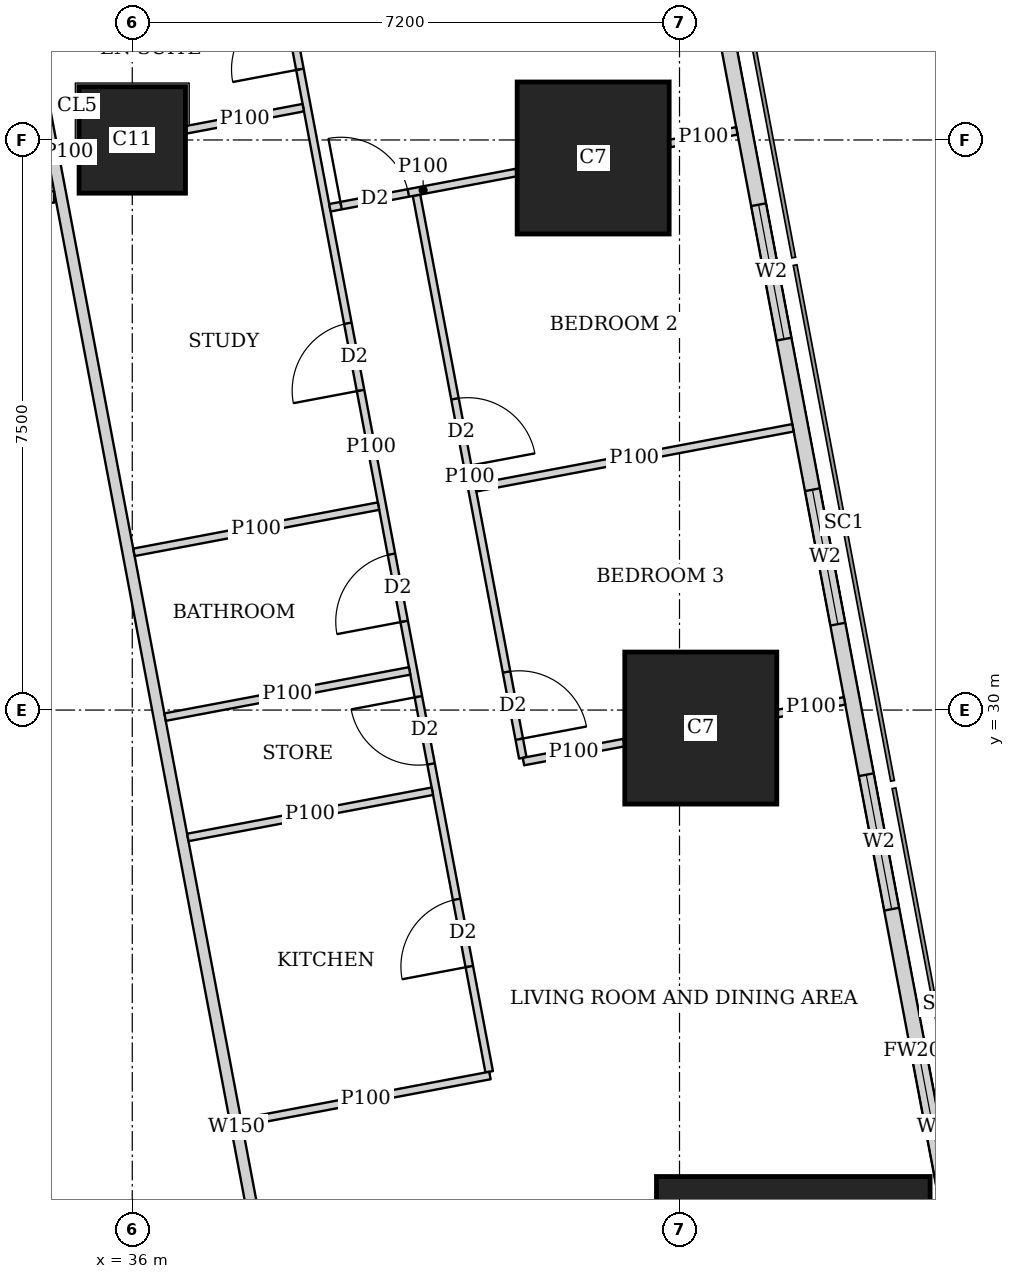
"""IFC4 building model, lengths in metres.
Left out: names, types, materials, properties, quantities, classifications, styles, units other than length and angle.
Written with IfcOpenShell. Run it as: python <this file> out.ifc"""

import sys

from ifc_helpers import new_model, si_unit, direction, frame, frame_2d, origin, origin_2d, place, context, subcontext, project, spatial, rectangle, extrude, element, fill, save


model = new_model("IFC4")
c1 = context("Model", 3, precision=1e-05, world=origin(), true_north=direction((0.0, 1.0)))
c2 = subcontext(c1, "Body", "Model", "MODEL_VIEW")
j1 = project(units=[si_unit("LENGTHUNIT", "METRE"), si_unit("PLANEANGLEUNIT", "RADIAN")], contexts=[c1])
p1 = place(None, origin())
s1 = spatial("IfcSite", under=j1, at=p1, CompositionType="ELEMENT")
p2 = place(p1, origin())
s2 = spatial("IfcBuilding", under=s1, at=p2, CompositionType="ELEMENT")
p3 = place(p2, frame((0.0, 0.0, 292.85)))
s3 = spatial("IfcBuildingStorey", under=s2, at=p3, CompositionType="ELEMENT", Elevation=292.85)
p4 = place(p3, frame((44.697, 22.263, 0.0), z_axis=(0.0, 0.0, 1.0), x_axis=(1.0, 0.0, 0.0)))
e1 = element("IfcColumn", 1, at=p4, inside=s3, PredefinedType="COLUMN", context=c2, shape_type="SweptSolid", body=[
    extrude(rectangle(XDim=3.6, YDim=3.2, at=origin_2d()), origin(), (0.0, 0.0, 1.0), 3.75),
])
p5 = place(p3, frame((43.48, 29.763, 0.0), z_axis=(0.0, 0.0, 1.0), x_axis=(1.0, 0.0, 0.0)))
e2 = element("IfcColumn", 2, at=p5, inside=s3, PredefinedType="COLUMN", context=c2, shape_type="SweptSolid", body=[
    extrude(rectangle(XDim=2.0, YDim=2.0, at=origin_2d()), origin(), (0.0, 0.0, 1.0), 3.75),
])
p6 = place(p3, frame((36.0, 37.5, 0.0), z_axis=(0.0, 0.0, 1.0), x_axis=(1.0, 0.0, 0.0)))
e3 = element("IfcColumn", 3, at=p6, inside=s3, PredefinedType="COLUMN", context=c2, shape_type="SweptSolid", body=[
    extrude(rectangle(XDim=1.4, YDim=1.4, at=origin_2d()), origin(), (0.0, 0.0, 1.0), 3.75),
])
p7 = place(p3, frame((42.064, 37.263, 0.0), z_axis=(0.0, 0.0, 1.0), x_axis=(1.0, 0.0, 0.0)))
e4 = element("IfcColumn", 4, at=p7, inside=s3, PredefinedType="COLUMN", context=c2, shape_type="SweptSolid", body=[
    extrude(rectangle(XDim=2.0, YDim=2.0, at=origin_2d()), origin(), (0.0, 0.0, 1.0), 3.75),
])
p8 = place(p3, frame((49.684, 7.832, 0.0), z_axis=(0.0, 0.0, 1.0), x_axis=(-0.185616669694, 0.982622232565, 0.0)))
e5 = element("IfcWall", 5, at=p8, inside=s3, PredefinedType="SOLIDWALL", context=c2, shape_type="SweptSolid", body=[
    extrude(rectangle(XDim=36.0, YDim=0.2, at=frame_2d((18.0, 0.0))), origin(), (0.0, 0.0, 1.0), 3.4),
])
p9 = place(p8, frame((2.518, 0.0, 0.9)))
e6 = element("IfcOpeningElement", 6, at=p9, cuts=e5, PredefinedType="OPENING", context=c2, shape_type="SweptSolid", body=[
    extrude(rectangle(XDim=2.4, YDim=1.5, at=frame_2d((1.2, 0.75))), frame((0.0, 0.11, 0.0), z_axis=(0.0, -1.0, 0.0), x_axis=(1.0, 0.0, 0.0)), (0.0, 0.0, 1.0), 0.22),
])
p10 = place(p8, frame((8.444, 0.0, 0.9)))
e7 = element("IfcOpeningElement", 7, at=p10, cuts=e5, PredefinedType="OPENING", context=c2, shape_type="SweptSolid", body=[
    extrude(rectangle(XDim=1.8, YDim=1.5, at=frame_2d((0.9, 0.75))), frame((0.0, 0.11, 0.0), z_axis=(0.0, -1.0, 0.0), x_axis=(1.0, 0.0, 0.0)), (0.0, 0.0, 1.0), 0.22),
])
p11 = place(p8, frame((12.261, 0.0, 0.9)))
e8 = element("IfcOpeningElement", 8, at=p11, cuts=e5, PredefinedType="OPENING", context=c2, shape_type="SweptSolid", body=[
    extrude(rectangle(XDim=1.8, YDim=1.5, at=frame_2d((0.9, 0.75))), frame((0.0, 0.11, 0.0), z_axis=(0.0, -1.0, 0.0), x_axis=(1.0, 0.0, 0.0)), (0.0, 0.0, 1.0), 0.22),
])
p12 = place(p8, frame((16.078, 0.0, 0.9)))
e9 = element("IfcOpeningElement", 9, at=p12, cuts=e5, PredefinedType="OPENING", context=c2, shape_type="SweptSolid", body=[
    extrude(rectangle(XDim=1.8, YDim=1.5, at=frame_2d((0.9, 0.75))), frame((0.0, 0.11, 0.0), z_axis=(0.0, -1.0, 0.0), x_axis=(1.0, 0.0, 0.0)), (0.0, 0.0, 1.0), 0.22),
])
p13 = place(p8, frame((19.894, 0.0, 0.9)))
e10 = element("IfcOpeningElement", 10, at=p13, cuts=e5, PredefinedType="OPENING", context=c2, shape_type="SweptSolid", body=[
    extrude(rectangle(XDim=1.8, YDim=1.5, at=frame_2d((0.9, 0.75))), frame((0.0, 0.11, 0.0), z_axis=(0.0, -1.0, 0.0), x_axis=(1.0, 0.0, 0.0)), (0.0, 0.0, 1.0), 0.22),
])
p14 = place(p8, frame((23.71, 0.0, 0.9)))
e11 = element("IfcOpeningElement", 11, at=p14, cuts=e5, PredefinedType="OPENING", context=c2, shape_type="SweptSolid", body=[
    extrude(rectangle(XDim=1.8, YDim=1.5, at=frame_2d((0.9, 0.75))), frame((0.0, 0.11, 0.0), z_axis=(0.0, -1.0, 0.0), x_axis=(1.0, 0.0, 0.0)), (0.0, 0.0, 1.0), 0.22),
])
p15 = place(p8, frame((27.526, 0.0, 0.9)))
e12 = element("IfcOpeningElement", 12, at=p15, cuts=e5, PredefinedType="OPENING", context=c2, shape_type="SweptSolid", body=[
    extrude(rectangle(XDim=1.8, YDim=1.5, at=frame_2d((0.9, 0.75))), frame((0.0, 0.11, 0.0), z_axis=(0.0, -1.0, 0.0), x_axis=(1.0, 0.0, 0.0)), (0.0, 0.0, 1.0), 0.22),
])
p16 = place(p8, frame((32.046, 0.0, 0.9)))
e13 = element("IfcOpeningElement", 13, at=p16, cuts=e5, PredefinedType="OPENING", context=c2, shape_type="SweptSolid", body=[
    extrude(rectangle(XDim=1.8, YDim=1.5, at=frame_2d((0.9, 0.75))), frame((0.0, 0.11, 0.0), z_axis=(0.0, -1.0, 0.0), x_axis=(1.0, 0.0, 0.0)), (0.0, 0.0, 1.0), 0.22),
])
p17 = place(p3, frame((29.501, 36.75, 0.0), z_axis=(0.0, 0.0, 1.0), x_axis=(1.0, 0.0, 0.0)))
e14 = element("IfcWall", 14, at=p17, inside=s3, PredefinedType="SOLIDWALL", context=c2, shape_type="SweptSolid", body=[
    extrude(rectangle(XDim=5.471, YDim=0.15, at=frame_2d((2.735, 0.0))), origin(), (0.0, 0.0, 1.0), 3.4),
])
p18 = place(p3, frame((34.036, 42.186, 0.0), z_axis=(0.0, 0.0, 1.0), x_axis=(0.185593518645, -0.9826266055, 0.0)))
e15 = element("IfcWall", 15, at=p18, inside=s3, PredefinedType="SOLIDWALL", context=c2, shape_type="SweptSolid", body=[
    extrude(rectangle(XDim=35.961, YDim=0.15, at=frame_2d((17.98, 0.0))), origin(), (0.0, 0.0, 1.0), 2.4),
])
p19 = place(p18, frame((19.345, 0.0, 0.0)))
e16 = element("IfcOpeningElement", 16, at=p19, cuts=e15, PredefinedType="OPENING", context=c2, shape_type="SweptSolid", body=[
    extrude(rectangle(XDim=1.0, YDim=2.1, at=frame_2d((0.5, 1.05))), frame((0.0, 0.085, 0.0), z_axis=(0.0, -1.0, 0.0), x_axis=(1.0, 0.0, 0.0)), (0.0, 0.0, 1.0), 0.17),
])
p20 = place(p18, frame((33.774, 0.0, 0.0)))
e17 = element("IfcOpeningElement", 17, at=p20, cuts=e15, PredefinedType="OPENING", context=c2, shape_type="SweptSolid", body=[
    extrude(rectangle(XDim=1.0, YDim=2.1, at=frame_2d((0.5, 1.05))), frame((0.0, 0.085, 0.0), z_axis=(0.0, -1.0, 0.0), x_axis=(1.0, 0.0, 0.0)), (0.0, 0.0, 1.0), 0.17),
])
p21 = place(p3, frame((43.955, 37.62, 0.0), z_axis=(0.0, 0.0, 1.0), x_axis=(-0.982708424405, -0.18515980288, 0.0)))
e18 = element("IfcWall", 18, at=p21, inside=s3, PredefinedType="PARTITIONING", context=c2, shape_type="SweptSolid", body=[
    extrude(rectangle(XDim=0.897, YDim=0.1, at=frame_2d((0.448, 0.0))), origin(), (0.0, 0.0, 1.0), 3.4),
])
p22 = place(p3, frame((41.054, 37.072, 0.0), z_axis=(0.0, 0.0, 1.0), x_axis=(-0.982579896219, -0.185840650951, 0.0)))
e19 = element("IfcWall", 19, at=p22, inside=s3, PredefinedType="PARTITIONING", context=c2, shape_type="SweptSolid", body=[
    extrude(rectangle(XDim=2.497, YDim=0.1, at=frame_2d((1.249, 0.0))), origin(), (0.0, 0.0, 1.0), 3.4),
])
p23 = place(p22, frame((1.447, 0.0, 0.0)))
e20 = element("IfcOpeningElement", 20, at=p23, cuts=e19, PredefinedType="OPENING", context=c2, shape_type="SweptSolid", body=[
    extrude(rectangle(XDim=0.9, YDim=2.1, at=frame_2d((0.45, 1.05))), frame((0.0, 0.06, 0.0), z_axis=(0.0, -1.0, 0.0), x_axis=(1.0, 0.0, 0.0)), (0.0, 0.0, 1.0), 0.12),
])
p24 = place(p3, frame((44.693, 33.713, 0.0), z_axis=(0.0, 0.0, 1.0), x_axis=(-0.982623519589, -0.185609856287, 0.0)))
e21 = element("IfcWall", 21, at=p24, inside=s3, PredefinedType="PARTITIONING", context=c2, shape_type="SweptSolid", body=[
    extrude(rectangle(XDim=4.25, YDim=0.1, at=frame_2d((2.125, 0.0))), origin(), (0.0, 0.0, 1.0), 2.4),
])
p25 = place(p3, frame((45.372, 30.121, 0.0), z_axis=(0.0, 0.0, 1.0), x_axis=(-0.982547416156, -0.186012297994, 0.0)))
e22 = element("IfcWall", 22, at=p25, inside=s3, PredefinedType="PARTITIONING", context=c2, shape_type="SweptSolid", body=[
    extrude(rectangle(XDim=0.898, YDim=0.1, at=frame_2d((0.449, 0.0))), origin(), (0.0, 0.0, 1.0), 3.4),
])
p26 = place(p3, frame((42.47, 29.572, 0.0), z_axis=(0.0, 0.0, 1.0), x_axis=(-0.982610503289, -0.185678751683, 0.0)))
e23 = element("IfcWall", 23, at=p26, inside=s3, PredefinedType="PARTITIONING", context=c2, shape_type="SweptSolid", body=[
    extrude(rectangle(XDim=1.346, YDim=0.1, at=frame_2d((0.673, 0.0))), origin(), (0.0, 0.0, 1.0), 2.4),
])
p27 = place(p3, frame((38.25, 37.925, 0.0), z_axis=(0.0, 0.0, 1.0), x_axis=(-0.982610209589, -0.185680305934, 0.0)))
e24 = element("IfcWall", 24, at=p27, inside=s3, PredefinedType="PARTITIONING", context=c2, shape_type="SweptSolid", body=[
    extrude(rectangle(XDim=1.567, YDim=0.1, at=frame_2d((0.784, 0.0))), origin(), (0.0, 0.0, 1.0), 3.4),
])
p28 = place(p3, frame((35.29, 37.366, 0.0), z_axis=(0.0, 0.0, 1.0), x_axis=(-0.982395465615, -0.18681313963, 0.0)))
e25 = element("IfcWall", 25, at=p28, inside=s3, PredefinedType="PARTITIONING", context=c2, shape_type="SweptSolid", body=[
    extrude(rectangle(XDim=0.263, YDim=0.1, at=frame_2d((0.131, 0.0))), origin(), (0.0, 0.0, 1.0), 3.4),
])
p29 = place(p3, frame((39.24, 32.683, 0.0), z_axis=(0.0, 0.0, 1.0), x_axis=(-0.982607026909, -0.185697147715, 0.0)))
e26 = element("IfcWall", 26, at=p29, inside=s3, PredefinedType="PARTITIONING", context=c2, shape_type="SweptSolid", body=[
    extrude(rectangle(XDim=3.275, YDim=0.1, at=frame_2d((1.637, 0.0))), origin(), (0.0, 0.0, 1.0), 3.4),
])
p30 = place(p3, frame((39.948, 28.932, 0.0), z_axis=(0.0, 0.0, 1.0), x_axis=(-0.982610347627, -0.185679575441, 0.0)))
e27 = element("IfcWall", 27, at=p30, inside=s3, PredefinedType="PARTITIONING", context=c2, shape_type="SweptSolid", body=[
    extrude(rectangle(XDim=3.274, YDim=0.1, at=frame_2d((1.637, 0.0))), origin(), (0.0, 0.0, 1.0), 3.4),
])
p31 = place(p3, frame((40.706, 25.192, 0.0), z_axis=(0.0, 0.0, 1.0), x_axis=(-0.982633623707, -0.185556356831, 0.0)))
e28 = element("IfcWall", 28, at=p31, inside=s3, PredefinedType="PARTITIONING", context=c2, shape_type="SweptSolid", body=[
    extrude(rectangle(XDim=3.325, YDim=0.1, at=frame_2d((1.663, 0.0))), origin(), (0.0, 0.0, 1.0), 3.4),
])
p32 = place(p3, frame((39.649, 30.515, 0.0), z_axis=(0.0, 0.0, 1.0), x_axis=(-0.982610347627, -0.185679575441, 0.0)))
e29 = element("IfcWall", 29, at=p32, inside=s3, PredefinedType="PARTITIONING", context=c2, shape_type="SweptSolid", body=[
    extrude(rectangle(XDim=3.274, YDim=0.1, at=frame_2d((1.637, 0.0))), origin(), (0.0, 0.0, 1.0), 2.4),
])
p33 = place(p3, frame((37.591, 41.685, 0.0), z_axis=(0.0, 0.0, 1.0), x_axis=(0.185541820726, -0.982636368532, 0.0)))
e30 = element("IfcWall", 30, at=p33, inside=s3, PredefinedType="PARTITIONING", context=c2, shape_type="SweptSolid", body=[
    extrude(rectangle(XDim=16.735, YDim=0.1, at=frame_2d((8.367, 0.0))), origin(), (0.0, 0.0, 1.0), 2.4),
])
p34 = place(p33, frame((2.413, 0.0, 0.0)))
e31 = element("IfcOpeningElement", 31, at=p34, cuts=e30, PredefinedType="OPENING", context=c2, shape_type="SweptSolid", body=[
    extrude(rectangle(XDim=0.9, YDim=2.1, at=frame_2d((0.45, 1.05))), frame((0.0, 0.06, 0.0), z_axis=(0.0, -1.0, 0.0), x_axis=(1.0, 0.0, 0.0)), (0.0, 0.0, 1.0), 0.12),
])
p35 = place(p33, frame((6.713, 0.0, 0.0)))
e32 = element("IfcOpeningElement", 32, at=p35, cuts=e30, PredefinedType="OPENING", context=c2, shape_type="SweptSolid", body=[
    extrude(rectangle(XDim=0.9, YDim=2.1, at=frame_2d((0.45, 1.05))), frame((0.0, 0.06, 0.0), z_axis=(0.0, -1.0, 0.0), x_axis=(1.0, 0.0, 0.0)), (0.0, 0.0, 1.0), 0.12),
])
p36 = place(p33, frame((9.805, 0.0, 0.0)))
e33 = element("IfcOpeningElement", 33, at=p36, cuts=e30, PredefinedType="OPENING", context=c2, shape_type="SweptSolid", body=[
    extrude(rectangle(XDim=0.9, YDim=2.1, at=frame_2d((0.45, 1.05))), frame((0.0, 0.06, 0.0), z_axis=(0.0, -1.0, 0.0), x_axis=(1.0, 0.0, 0.0)), (0.0, 0.0, 1.0), 0.12),
])
p37 = place(p33, frame((11.713, 0.0, 0.0)))
e34 = element("IfcOpeningElement", 34, at=p37, cuts=e30, PredefinedType="OPENING", context=c2, shape_type="SweptSolid", body=[
    extrude(rectangle(XDim=0.9, YDim=2.1, at=frame_2d((0.45, 1.05))), frame((0.0, 0.06, 0.0), z_axis=(0.0, -1.0, 0.0), x_axis=(1.0, 0.0, 0.0)), (0.0, 0.0, 1.0), 0.12),
])
p38 = place(p33, frame((14.426, 0.0, 0.0)))
e35 = element("IfcOpeningElement", 35, at=p38, cuts=e30, PredefinedType="OPENING", context=c2, shape_type="SweptSolid", body=[
    extrude(rectangle(XDim=0.9, YDim=2.1, at=frame_2d((0.45, 1.05))), frame((0.0, 0.06, 0.0), z_axis=(0.0, -1.0, 0.0), x_axis=(1.0, 0.0, 0.0)), (0.0, 0.0, 1.0), 0.12),
])
p39 = place(p3, frame((39.74, 36.773, 0.0), z_axis=(0.0, 0.0, 1.0), x_axis=(0.185583825641, -0.982628436216, 0.0)))
e36 = element("IfcWall", 36, at=p39, inside=s3, PredefinedType="PARTITIONING", context=c2, shape_type="SweptSolid", body=[
    extrude(rectangle(XDim=7.533, YDim=0.1, at=frame_2d((3.766, 0.0))), origin(), (0.0, 0.0, 1.0), 2.4),
])
p40 = place(p39, frame((2.726, 0.0, 0.0)))
e37 = element("IfcOpeningElement", 37, at=p40, cuts=e36, PredefinedType="OPENING", context=c2, shape_type="SweptSolid", body=[
    extrude(rectangle(XDim=0.9, YDim=2.1, at=frame_2d((0.45, 1.05))), frame((0.0, 0.06, 0.0), z_axis=(0.0, -1.0, 0.0), x_axis=(1.0, 0.0, 0.0)), (0.0, 0.0, 1.0), 0.12),
])
p41 = place(p39, frame((6.383, 0.0, 0.0)))
e38 = element("IfcOpeningElement", 38, at=p41, cuts=e36, PredefinedType="OPENING", context=c2, shape_type="SweptSolid", body=[
    extrude(rectangle(XDim=0.9, YDim=2.1, at=frame_2d((0.45, 1.05))), frame((0.0, 0.06, 0.0), z_axis=(0.0, -1.0, 0.0), x_axis=(1.0, 0.0, 0.0)), (0.0, 0.0, 1.0), 0.12),
])
p42 = place(p3, frame((35.83, 15.713, 0.0), z_axis=(0.0, 0.0, 1.0), x_axis=(-0.185534724166, 0.982637708481, 0.0)))
e39 = element("IfcWall", 39, at=p42, inside=s3, PredefinedType="PARTITIONING", context=c2, shape_type="SweptSolid", body=[
    extrude(rectangle(XDim=13.814, YDim=0.125, at=frame_2d((6.907, 0.0))), origin(), (0.0, 0.0, 1.0), 2.4),
])
p43 = place(p42, frame((5.35, 0.0, 0.0)))
e40 = element("IfcOpeningElement", 40, at=p43, cuts=e39, PredefinedType="OPENING", context=c2, shape_type="SweptSolid", body=[
    extrude(rectangle(XDim=1.0, YDim=2.1, at=frame_2d((0.5, 1.05))), frame((0.0, 0.073, 0.0), z_axis=(0.0, -1.0, 0.0), x_axis=(1.0, 0.0, 0.0)), (0.0, 0.0, 1.0), 0.145),
])
p44 = place(p12, origin())
e41 = element("IfcWindow", 41, at=p44, inside=s3, PartitioningType="SINGLE_PANEL", PredefinedType="WINDOW", context=c2, shape_type="SweptSolid", body=[
    extrude(rectangle(XDim=1.8, YDim=1.5, at=frame_2d((0.9, 0.75))), frame((0.0, 0.03, 0.0), z_axis=(0.0, -1.0, 0.0), x_axis=(1.0, 0.0, 0.0)), (0.0, 0.0, 1.0), 0.06),
])
fill(e9, e41)
p45 = place(p13, origin())
e42 = element("IfcWindow", 42, at=p45, inside=s3, PartitioningType="SINGLE_PANEL", PredefinedType="WINDOW", context=c2, shape_type="SweptSolid", body=[
    extrude(rectangle(XDim=1.8, YDim=1.5, at=frame_2d((0.9, 0.75))), frame((0.0, 0.03, 0.0), z_axis=(0.0, -1.0, 0.0), x_axis=(1.0, 0.0, 0.0)), (0.0, 0.0, 1.0), 0.06),
])
fill(e10, e42)
p46 = place(p14, origin())
e43 = element("IfcWindow", 43, at=p46, inside=s3, PartitioningType="SINGLE_PANEL", PredefinedType="WINDOW", context=c2, shape_type="SweptSolid", body=[
    extrude(rectangle(XDim=1.8, YDim=1.5, at=frame_2d((0.9, 0.75))), frame((0.0, 0.03, 0.0), z_axis=(0.0, -1.0, 0.0), x_axis=(1.0, 0.0, 0.0)), (0.0, 0.0, 1.0), 0.06),
])
fill(e11, e43)
p47 = place(p15, origin())
e44 = element("IfcWindow", 44, at=p47, inside=s3, PartitioningType="SINGLE_PANEL", PredefinedType="WINDOW", context=c2, shape_type="SweptSolid", body=[
    extrude(rectangle(XDim=1.8, YDim=1.5, at=frame_2d((0.9, 0.75))), frame((0.0, 0.03, 0.0), z_axis=(0.0, -1.0, 0.0), x_axis=(1.0, 0.0, 0.0)), (0.0, 0.0, 1.0), 0.06),
])
fill(e12, e44)
p48 = place(p23, origin())
e45 = element("IfcDoor", 45, at=p48, inside=s3, OperationType="SINGLE_SWING_LEFT", PredefinedType="DOOR", context=c2, shape_type="SweptSolid", body=[
    extrude(rectangle(XDim=0.9, YDim=2.1, at=frame_2d((0.45, 1.05))), frame((0.0, 0.025, 0.0), z_axis=(0.0, -1.0, 0.0), x_axis=(1.0, 0.0, 0.0)), (0.0, 0.0, 1.0), 0.05),
])
fill(e20, e45)
p49 = place(p34, origin())
e46 = element("IfcDoor", 46, at=p49, inside=s3, OperationType="SINGLE_SWING_LEFT", PredefinedType="DOOR", context=c2, shape_type="SweptSolid", body=[
    extrude(rectangle(XDim=0.9, YDim=2.1, at=frame_2d((0.45, 1.05))), frame((0.0, 0.025, 0.0), z_axis=(0.0, -1.0, 0.0), x_axis=(1.0, 0.0, 0.0)), (0.0, 0.0, 1.0), 0.05),
])
fill(e31, e46)
p50 = place(p35, origin())
e47 = element("IfcDoor", 47, at=p50, inside=s3, OperationType="SINGLE_SWING_LEFT", PredefinedType="DOOR", context=c2, shape_type="SweptSolid", body=[
    extrude(rectangle(XDim=0.9, YDim=2.1, at=frame_2d((0.45, 1.05))), frame((0.0, 0.025, 0.0), z_axis=(0.0, -1.0, 0.0), x_axis=(1.0, 0.0, 0.0)), (0.0, 0.0, 1.0), 0.05),
])
fill(e32, e47)
p51 = place(p36, origin())
e48 = element("IfcDoor", 48, at=p51, inside=s3, OperationType="SINGLE_SWING_LEFT", PredefinedType="DOOR", context=c2, shape_type="SweptSolid", body=[
    extrude(rectangle(XDim=0.9, YDim=2.1, at=frame_2d((0.45, 1.05))), frame((0.0, 0.025, 0.0), z_axis=(0.0, -1.0, 0.0), x_axis=(1.0, 0.0, 0.0)), (0.0, 0.0, 1.0), 0.05),
])
fill(e33, e48)
p52 = place(p37, origin())
e49 = element("IfcDoor", 49, at=p52, inside=s3, OperationType="SINGLE_SWING_RIGHT", PredefinedType="DOOR", context=c2, shape_type="SweptSolid", body=[
    extrude(rectangle(XDim=0.9, YDim=2.1, at=frame_2d((0.45, 1.05))), frame((0.0, 0.025, 0.0), z_axis=(0.0, -1.0, 0.0), x_axis=(1.0, 0.0, 0.0)), (0.0, 0.0, 1.0), 0.05),
])
fill(e34, e49)
p53 = place(p38, origin())
e50 = element("IfcDoor", 50, at=p53, inside=s3, OperationType="SINGLE_SWING_LEFT", PredefinedType="DOOR", context=c2, shape_type="SweptSolid", body=[
    extrude(rectangle(XDim=0.9, YDim=2.1, at=frame_2d((0.45, 1.05))), frame((0.0, 0.025, 0.0), z_axis=(0.0, -1.0, 0.0), x_axis=(1.0, 0.0, 0.0)), (0.0, 0.0, 1.0), 0.05),
])
fill(e35, e50)
p54 = place(p40, origin())
e51 = element("IfcDoor", 51, at=p54, inside=s3, OperationType="SINGLE_SWING_RIGHT", PredefinedType="DOOR", context=c2, shape_type="SweptSolid", body=[
    extrude(rectangle(XDim=0.9, YDim=2.1, at=frame_2d((0.45, 1.05))), frame((0.0, 0.025, 0.0), z_axis=(0.0, -1.0, 0.0), x_axis=(1.0, 0.0, 0.0)), (0.0, 0.0, 1.0), 0.05),
])
fill(e37, e51)
p55 = place(p41, origin())
e52 = element("IfcDoor", 52, at=p55, inside=s3, OperationType="SINGLE_SWING_RIGHT", PredefinedType="DOOR", context=c2, shape_type="SweptSolid", body=[
    extrude(rectangle(XDim=0.9, YDim=2.1, at=frame_2d((0.45, 1.05))), frame((0.0, 0.025, 0.0), z_axis=(0.0, -1.0, 0.0), x_axis=(1.0, 0.0, 0.0)), (0.0, 0.0, 1.0), 0.05),
])
fill(e38, e52)
save(model, sys.argv[1])
